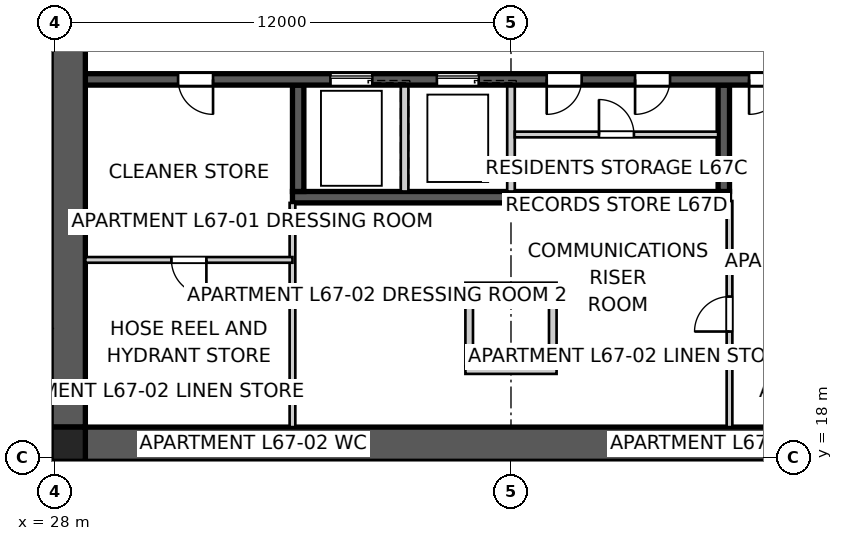
"""IFC4 building model, lengths in metres.
Left out: names, types, materials, properties, quantities, classifications, styles, units other than length and angle.
Written with IfcOpenShell. Run it as: python <this file> out.ifc"""

import sys

from ifc_helpers import new_model, si_unit, direction, frame, frame_2d, origin, origin_2d, place, context, subcontext, project, spatial, polyline, rectangle, outline, extrude, element, fill, save


model = new_model("IFC4")
c1 = context("Model", 3, precision=1e-05, world=origin(), true_north=direction((0.0, 1.0)))
c2 = subcontext(c1, "Body", "Model", "MODEL_VIEW")
j1 = project(units=[si_unit("LENGTHUNIT", "METRE"), si_unit("PLANEANGLEUNIT", "RADIAN")], contexts=[c1])
p1 = place(None, origin())
s1 = spatial("IfcSite", under=j1, at=p1, CompositionType="ELEMENT")
p2 = place(p1, origin())
s2 = spatial("IfcBuilding", under=s1, at=p2, CompositionType="ELEMENT")
p3 = place(p2, frame((0.0, 0.0, 243.8)))
s3 = spatial("IfcBuildingStorey", under=s2, at=p3, CompositionType="ELEMENT", Elevation=243.8)
p4 = place(p3, frame((51.2, 18.35, 0.0), z_axis=(0.0, 0.0, 1.0), x_axis=(-1.0, 0.0, 0.0)))
e1 = element("IfcWall", 1, at=p4, inside=s3, PredefinedType="SHEAR", context=c2, shape_type="SweptSolid", body=[
    extrude(outline(polyline([(0.0, -0.45), (22.4, -0.45), (22.4, -0.025), (22.85, -0.025), (22.85, 0.025), (22.4, 0.025), (22.4, 0.45), (0.0, 0.45), (0.0, 0.025), (-0.45, 0.025), (-0.45, -0.025), (0.0, -0.025), (0.0, -0.45)])), origin(), (0.0, 0.0, 1.0), 3.4),
])
p5 = place(p3, frame((28.35, 41.2, 0.0), z_axis=(0.0, 0.0, 1.0), x_axis=(0.0, -1.0, 0.0)))
e2 = element("IfcWall", 2, at=p5, inside=s3, PredefinedType="SHEAR", context=c2, shape_type="SweptSolid", body=[
    extrude(outline(polyline([(0.0, -0.45), (22.4, -0.45), (22.4, -0.025), (22.85, -0.025), (22.85, 0.025), (22.4, 0.025), (22.4, 0.45), (0.0, 0.45), (0.0, 0.025), (-0.45, 0.025), (-0.45, -0.025), (0.0, -0.025), (0.0, -0.45)])), origin(), (0.0, 0.0, 1.0), 3.4),
])
p6 = place(p5, frame((11.14, 0.0, 0.0)))
e3 = element("IfcOpeningElement", 3, at=p6, cuts=e2, PredefinedType="OPENING", context=c2, shape_type="SweptSolid", body=[
    extrude(rectangle(XDim=1.02, YDim=2.4, at=frame_2d((0.51, 1.2))), frame((0.0, 0.46, 0.0), z_axis=(0.0, -1.0, 0.0), x_axis=(1.0, 0.0, 0.0)), (0.0, 0.0, 1.0), 0.92),
])
p7 = place(p3, frame((51.2, 27.95, 0.0), z_axis=(0.0, 0.0, 1.0), x_axis=(-1.0, 0.0, 0.0)))
e4 = element("IfcWall", 4, at=p7, inside=s3, PredefinedType="SHEAR", context=c2, shape_type="SweptSolid", body=[
    extrude(rectangle(XDim=22.4, YDim=0.3, at=frame_2d((11.2, 0.0))), origin(), (0.0, 0.0, 1.0), 3.4),
])
p8 = place(p7, frame((19.04, 0.0, 0.0)))
e5 = element("IfcOpeningElement", 5, at=p8, cuts=e4, PredefinedType="OPENING", context=c2, shape_type="SweptSolid", body=[
    extrude(rectangle(XDim=0.92, YDim=2.1, at=frame_2d((0.46, 1.05))), frame((0.0, 0.16, 0.0), z_axis=(0.0, -1.0, 0.0), x_axis=(1.0, 0.0, 0.0)), (0.0, 0.0, 1.0), 0.32),
])
p9 = place(p7, frame((1.265, 0.0, 0.0)))
e6 = element("IfcOpeningElement", 6, at=p9, cuts=e4, PredefinedType="OPENING", context=c2, shape_type="SweptSolid", body=[
    extrude(rectangle(XDim=1.02, YDim=2.1, at=frame_2d((0.51, 1.05))), frame((0.0, 0.16, 0.0), z_axis=(0.0, -1.0, 0.0), x_axis=(1.0, 0.0, 0.0)), (0.0, 0.0, 1.0), 0.32),
])
p10 = place(p7, frame((4.015, 0.0, 0.0)))
e7 = element("IfcOpeningElement", 7, at=p10, cuts=e4, PredefinedType="OPENING", context=c2, shape_type="SweptSolid", body=[
    extrude(rectangle(XDim=0.92, YDim=2.1, at=frame_2d((0.46, 1.05))), frame((0.0, 0.16, 0.0), z_axis=(0.0, -1.0, 0.0), x_axis=(1.0, 0.0, 0.0)), (0.0, 0.0, 1.0), 0.32),
])
p11 = place(p7, frame((9.34, 0.0, 0.0)))
e8 = element("IfcOpeningElement", 8, at=p11, cuts=e4, PredefinedType="OPENING", context=c2, shape_type="SweptSolid", body=[
    extrude(rectangle(XDim=0.92, YDim=2.1, at=frame_2d((0.46, 1.05))), frame((0.0, 0.16, 0.0), z_axis=(0.0, -1.0, 0.0), x_axis=(1.0, 0.0, 0.0)), (0.0, 0.0, 1.0), 0.32),
])
p12 = place(p7, frame((7.015, 0.0, 0.0)))
e9 = element("IfcOpeningElement", 9, at=p12, cuts=e4, PredefinedType="OPENING", context=c2, shape_type="SweptSolid", body=[
    extrude(rectangle(XDim=0.92, YDim=2.1, at=frame_2d((0.46, 1.05))), frame((0.0, 0.16, 0.0), z_axis=(0.0, -1.0, 0.0), x_axis=(1.0, 0.0, 0.0)), (0.0, 0.0, 1.0), 0.32),
])
p13 = place(p7, frame((12.05, 0.0, 0.0)))
e10 = element("IfcOpeningElement", 10, at=p13, cuts=e4, PredefinedType="OPENING", context=c2, shape_type="SweptSolid", body=[
    extrude(rectangle(XDim=1.1, YDim=2.1, at=frame_2d((0.55, 1.05))), frame((0.0, 0.16, 0.0), z_axis=(0.0, -1.0, 0.0), x_axis=(1.0, 0.0, 0.0)), (0.0, 0.0, 1.0), 0.32),
])
p14 = place(p7, frame((14.85, 0.0, 0.0)))
e11 = element("IfcOpeningElement", 11, at=p14, cuts=e4, PredefinedType="OPENING", context=c2, shape_type="SweptSolid", body=[
    extrude(rectangle(XDim=1.1, YDim=2.1, at=frame_2d((0.55, 1.05))), frame((0.0, 0.16, 0.0), z_axis=(0.0, -1.0, 0.0), x_axis=(1.0, 0.0, 0.0)), (0.0, 0.0, 1.0), 0.32),
])
p15 = place(p3, frame((45.75, 24.85, 0.0), z_axis=(0.0, 0.0, 1.0), x_axis=(-1.0, 0.0, 0.0)))
e12 = element("IfcWall", 12, at=p15, inside=s3, PredefinedType="SHEAR", context=c2, shape_type="SweptSolid", body=[
    extrude(rectangle(XDim=11.5, YDim=0.3, at=frame_2d((5.75, 0.0))), origin(), (0.0, 0.0, 1.0), 3.4),
])
p16 = place(p3, frame((45.6, 27.8, 0.0), z_axis=(0.0, 0.0, 1.0), x_axis=(0.0, -1.0, 0.0)))
e13 = element("IfcWall", 13, at=p16, inside=s3, PredefinedType="SHEAR", context=c2, shape_type="SweptSolid", body=[
    extrude(rectangle(XDim=2.8, YDim=0.3, at=frame_2d((1.4, 0.0))), origin(), (0.0, 0.0, 1.0), 3.4),
])
for number, where, z_axis, x_axis in (
    (14, (40.0, 27.8, 0.0), (0.0, 0.0, 1.0), (0.0, -1.0, 0.0)),
    (15, (37.2, 27.8, 0.0), (0.0, 0.0, 1.0), (0.0, -1.0, 0.0)),
):
    element("IfcWall", number, at=place(p3, frame(where, z_axis=z_axis, x_axis=x_axis)), inside=s3, PredefinedType="SOLIDWALL", context=c2, shape_type="SweptSolid", body=[
        extrude(rectangle(XDim=2.8, YDim=0.2, at=frame_2d((1.4, 0.0))), origin(), (0.0, 0.0, 1.0), 3.4),
    ])
p17 = place(p3, frame((34.4, 27.8, 0.0), z_axis=(0.0, 0.0, 1.0), x_axis=(0.0, -1.0, 0.0)))
e16 = element("IfcWall", 16, at=p17, inside=s3, PredefinedType="SHEAR", context=c2, shape_type="SweptSolid", body=[
    extrude(rectangle(XDim=2.8, YDim=0.3, at=frame_2d((1.4, 0.0))), origin(), (0.0, 0.0, 1.0), 3.4),
])
for number, where, z_axis, x_axis in (
    (17, (38.9, 22.4, 0.0), (0.0, 0.0, 1.0), (0.0, -1.0, 0.0)),
    (18, (41.1, 22.4, 0.0), (0.0, 0.0, 1.0), (0.0, -1.0, 0.0)),
):
    element("IfcWall", number, at=place(p3, frame(where, z_axis=z_axis, x_axis=x_axis)), inside=s3, PredefinedType="SOLIDWALL", context=c2, shape_type="SweptSolid", body=[
        extrude(rectangle(XDim=2.0, YDim=0.2, at=frame_2d((1.0, 0.0))), origin(), (0.0, 0.0, 1.0), 3.4),
    ])
for number, where, z_axis, x_axis in (
    (19, (38.8, 22.5, 0.0), (0.0, 0.0, 1.0), (1.0, 0.0, 0.0)),
    (20, (38.8, 20.3, 0.0), (0.0, 0.0, 1.0), (1.0, 0.0, 0.0)),
):
    element("IfcWall", number, at=place(p3, frame(where, z_axis=z_axis, x_axis=x_axis)), inside=s3, PredefinedType="SOLIDWALL", context=c2, shape_type="SweptSolid", body=[
        extrude(rectangle(XDim=2.4, YDim=0.2, at=frame_2d((1.2, 0.0))), origin(), (0.0, 0.0, 1.0), 3.4),
    ])
p18 = place(p3, frame((28.35, 18.35, 0.0), z_axis=(0.0, 0.0, 1.0), x_axis=(1.0, 0.0, 0.0)))
e21 = element("IfcColumn", 21, at=p18, inside=s3, PredefinedType="COLUMN", context=c2, shape_type="SweptSolid", body=[
    extrude(rectangle(XDim=0.9, YDim=0.9, at=origin_2d()), origin(), (0.0, 0.0, 1.0), 3.4),
])
p19 = place(p3, frame((22.388, 17.668, 0.0), z_axis=(0.0, 0.0, 1.0), x_axis=(0.819161528122, 0.573562891796, 0.0)))
e22 = element("IfcWall", 22, at=p19, inside=s3, PredefinedType="PARTITIONING", context=c2, shape_type="SweptSolid", body=[
    extrude(rectangle(XDim=6.681, YDim=0.25, at=frame_2d((3.341, 0.0))), origin(), (0.0, 0.0, 1.0), 3.25),
])
p20 = place(p3, frame((45.75, 18.8, 0.0), z_axis=(0.0, 0.0, 1.0), x_axis=(0.0, 1.0, 0.0)))
e23 = element("IfcWall", 23, at=p20, inside=s3, PredefinedType="SOLIDWALL", context=c2, shape_type="SweptSolid", body=[
    extrude(rectangle(XDim=5.95, YDim=0.15, at=frame_2d((2.975, 0.0))), origin(), (0.0, 0.0, 1.0), 3.25),
])
p21 = place(p20, frame((2.515, 0.0, 0.0)))
e24 = element("IfcOpeningElement", 24, at=p21, cuts=e23, PredefinedType="OPENING", context=c2, shape_type="SweptSolid", body=[
    extrude(rectangle(XDim=0.92, YDim=2.1, at=frame_2d((0.46, 1.05))), frame((0.0, 0.085, 0.0), z_axis=(0.0, -1.0, 0.0), x_axis=(1.0, 0.0, 0.0)), (0.0, 0.0, 1.0), 0.17),
])
p22 = place(p3, frame((34.25, 18.8, 0.0), z_axis=(0.0, 0.0, 1.0), x_axis=(0.0, 1.0, 0.0)))
e25 = element("IfcWall", 25, at=p22, inside=s3, PredefinedType="SOLIDWALL", context=c2, shape_type="SweptSolid", body=[
    extrude(rectangle(XDim=5.9, YDim=0.15, at=frame_2d((2.95, 0.0))), origin(), (0.0, 0.0, 1.0), 3.25),
])
p23 = place(p3, frame((34.25, 23.2, 0.0), z_axis=(0.0, 0.0, 1.0), x_axis=(-1.0, 0.0, 0.0)))
e26 = element("IfcWall", 26, at=p23, inside=s3, PredefinedType="SOLIDWALL", context=c2, shape_type="SweptSolid", body=[
    extrude(rectangle(XDim=5.45, YDim=0.15, at=frame_2d((2.725, 0.0))), origin(), (0.0, 0.0, 1.0), 3.25),
])
p24 = place(p23, frame((2.265, 0.0, 0.0)))
e27 = element("IfcOpeningElement", 27, at=p24, cuts=e26, PredefinedType="OPENING", context=c2, shape_type="SweptSolid", body=[
    extrude(rectangle(XDim=0.92, YDim=2.1, at=frame_2d((0.46, 1.05))), frame((0.0, 0.085, 0.0), z_axis=(0.0, -1.0, 0.0), x_axis=(1.0, 0.0, 0.0)), (0.0, 0.0, 1.0), 0.17),
])
p25 = place(p3, frame((40.1, 26.5, 0.0), z_axis=(0.0, 0.0, 1.0), x_axis=(1.0, 0.0, 0.0)))
e28 = element("IfcWall", 28, at=p25, inside=s3, PredefinedType="SOLIDWALL", context=c2, shape_type="SweptSolid", body=[
    extrude(rectangle(XDim=5.35, YDim=0.15, at=frame_2d((2.675, 0.0))), origin(), (0.0, 0.0, 1.0), 3.25),
])
p26 = place(p25, frame((2.215, 0.0, 0.0)))
e29 = element("IfcOpeningElement", 29, at=p26, cuts=e28, PredefinedType="OPENING", context=c2, shape_type="SweptSolid", body=[
    extrude(rectangle(XDim=0.92, YDim=2.1, at=frame_2d((0.46, 1.05))), frame((0.0, 0.085, 0.0), z_axis=(0.0, -1.0, 0.0), x_axis=(1.0, 0.0, 0.0)), (0.0, 0.0, 1.0), 0.17),
])
p27 = place(p8, origin())
e30 = element("IfcDoor", 30, at=p27, inside=s3, OperationType="SINGLE_SWING_LEFT", PredefinedType="DOOR", context=c2, shape_type="SweptSolid", body=[
    extrude(rectangle(XDim=0.92, YDim=2.1, at=frame_2d((0.46, 1.05))), frame((0.0, 0.025, 0.0), z_axis=(0.0, -1.0, 0.0), x_axis=(1.0, 0.0, 0.0)), (0.0, 0.0, 1.0), 0.05),
])
fill(e5, e30)
p28 = place(p10, origin())
e31 = element("IfcDoor", 31, at=p28, inside=s3, OperationType="SINGLE_SWING_RIGHT", PredefinedType="DOOR", context=c2, shape_type="SweptSolid", body=[
    extrude(rectangle(XDim=0.92, YDim=2.1, at=frame_2d((0.46, 1.05))), frame((0.0, 0.025, 0.0), z_axis=(0.0, -1.0, 0.0), x_axis=(1.0, 0.0, 0.0)), (0.0, 0.0, 1.0), 0.05),
])
fill(e7, e31)
p29 = place(p24, origin())
e32 = element("IfcDoor", 32, at=p29, inside=s3, OperationType="SINGLE_SWING_LEFT", PredefinedType="DOOR", context=c2, shape_type="SweptSolid", body=[
    extrude(rectangle(XDim=0.92, YDim=2.1, at=frame_2d((0.46, 1.05))), frame((0.0, 0.025, 0.0), z_axis=(0.0, -1.0, 0.0), x_axis=(1.0, 0.0, 0.0)), (0.0, 0.0, 1.0), 0.05),
])
fill(e27, e32)
p30 = place(p21, origin())
e33 = element("IfcDoor", 33, at=p30, inside=s3, OperationType="SINGLE_SWING_LEFT", PredefinedType="DOOR", context=c2, shape_type="SweptSolid", body=[
    extrude(rectangle(XDim=0.92, YDim=2.1, at=frame_2d((0.46, 1.05))), frame((0.0, 0.025, 0.0), z_axis=(0.0, -1.0, 0.0), x_axis=(1.0, 0.0, 0.0)), (0.0, 0.0, 1.0), 0.05),
])
fill(e24, e33)
p31 = place(p11, origin())
e34 = element("IfcDoor", 34, at=p31, inside=s3, OperationType="SINGLE_SWING_RIGHT", PredefinedType="DOOR", context=c2, shape_type="SweptSolid", body=[
    extrude(rectangle(XDim=0.92, YDim=2.1, at=frame_2d((0.46, 1.05))), frame((0.0, 0.025, 0.0), z_axis=(0.0, -1.0, 0.0), x_axis=(1.0, 0.0, 0.0)), (0.0, 0.0, 1.0), 0.05),
])
fill(e8, e34)
p32 = place(p12, origin())
e35 = element("IfcDoor", 35, at=p32, inside=s3, OperationType="SINGLE_SWING_RIGHT", PredefinedType="DOOR", context=c2, shape_type="SweptSolid", body=[
    extrude(rectangle(XDim=0.92, YDim=2.1, at=frame_2d((0.46, 1.05))), frame((0.0, 0.025, 0.0), z_axis=(0.0, -1.0, 0.0), x_axis=(1.0, 0.0, 0.0)), (0.0, 0.0, 1.0), 0.05),
])
fill(e9, e35)
p33 = place(p26, origin())
e36 = element("IfcDoor", 36, at=p33, inside=s3, OperationType="SINGLE_SWING_LEFT", PredefinedType="DOOR", context=c2, shape_type="SweptSolid", body=[
    extrude(rectangle(XDim=0.92, YDim=2.1, at=frame_2d((0.46, 1.05))), frame((0.0, 0.025, 0.0), z_axis=(0.0, -1.0, 0.0), x_axis=(1.0, 0.0, 0.0)), (0.0, 0.0, 1.0), 0.05),
])
fill(e29, e36)
p34 = place(p13, origin())
e37 = element("IfcDoor", 37, at=p34, inside=s3, OperationType="SLIDING_TO_LEFT", PredefinedType="DOOR", context=c2, shape_type="SweptSolid", body=[
    extrude(rectangle(XDim=1.1, YDim=2.1, at=frame_2d((0.55, 1.05))), frame((0.0, 0.025, 0.0), z_axis=(0.0, -1.0, 0.0), x_axis=(1.0, 0.0, 0.0)), (0.0, 0.0, 1.0), 0.05),
])
fill(e10, e37)
p35 = place(p14, origin())
e38 = element("IfcDoor", 38, at=p35, inside=s3, OperationType="SLIDING_TO_LEFT", PredefinedType="DOOR", context=c2, shape_type="SweptSolid", body=[
    extrude(rectangle(XDim=1.1, YDim=2.1, at=frame_2d((0.55, 1.05))), frame((0.0, 0.025, 0.0), z_axis=(0.0, -1.0, 0.0), x_axis=(1.0, 0.0, 0.0)), (0.0, 0.0, 1.0), 0.05),
])
fill(e11, e38)
save(model, sys.argv[1])
